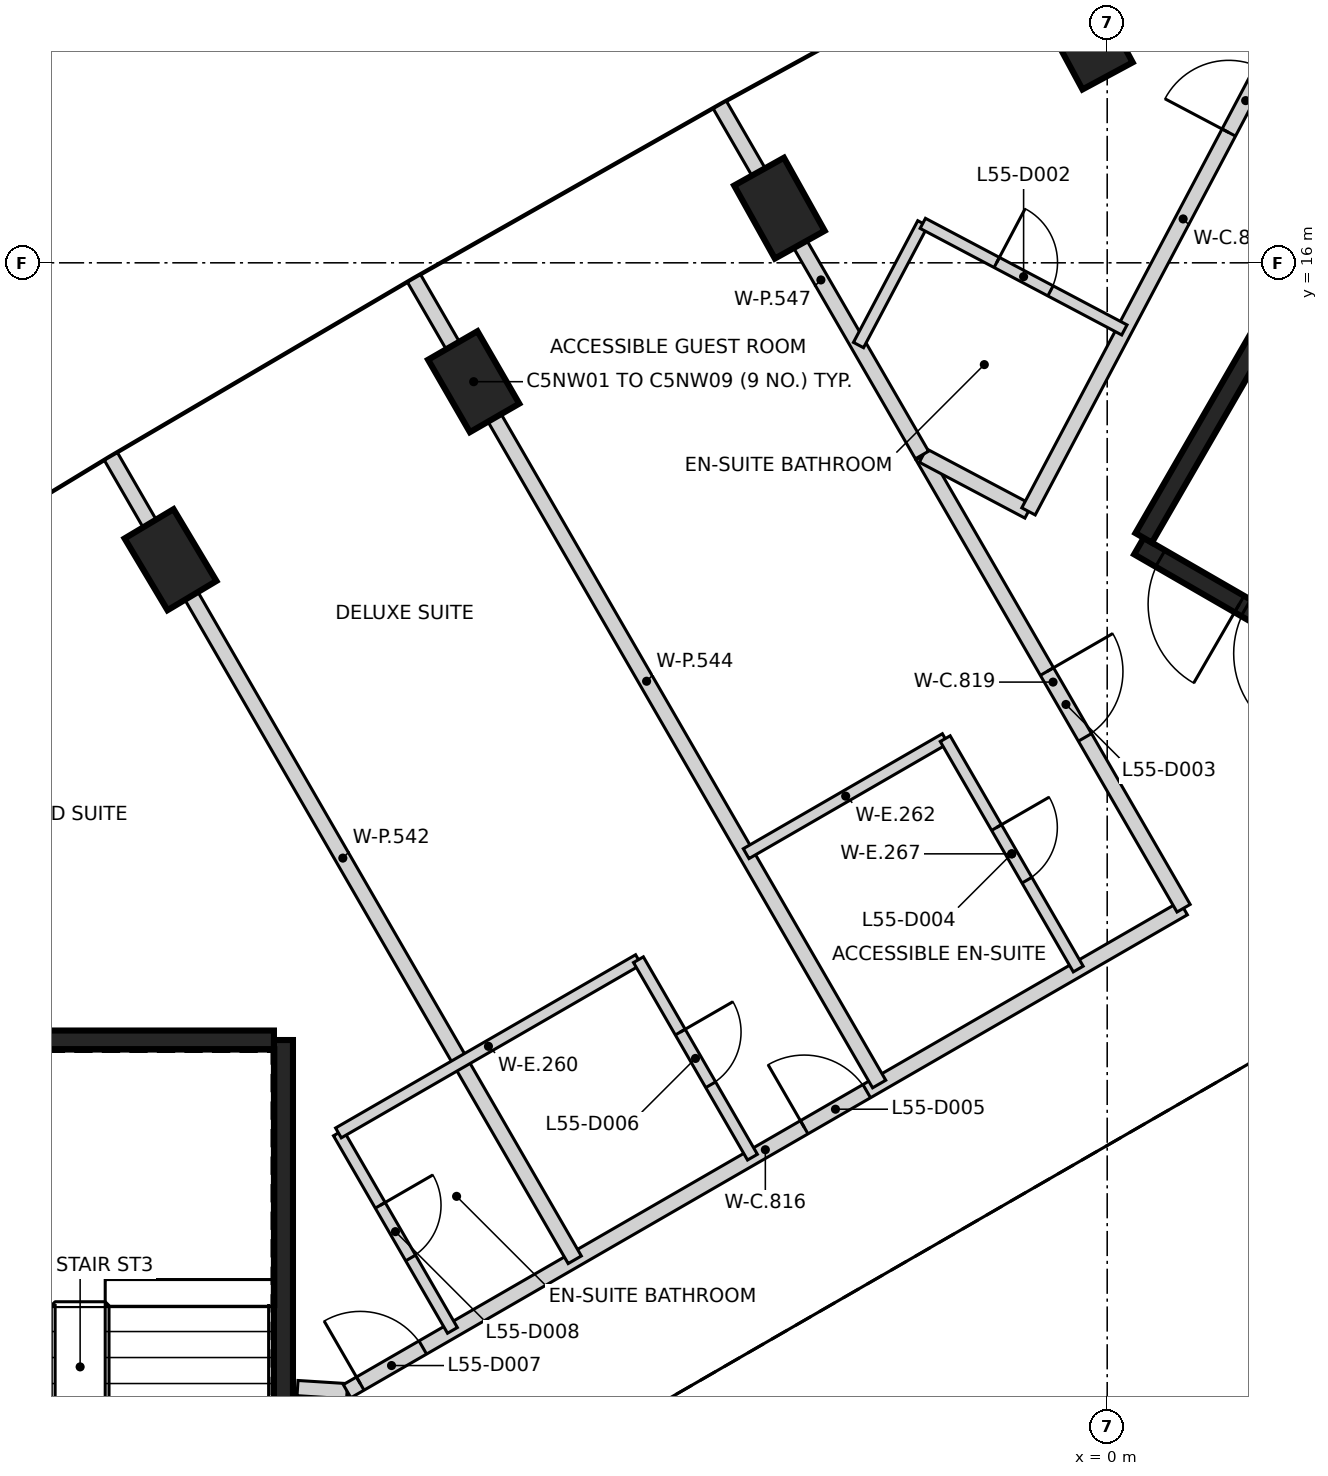
"""IFC4 building model, lengths in metres.
Left out: names, types, materials, properties, quantities, classifications, styles, units other than length and angle.
Written with IfcOpenShell. Run it as: python <this file> out.ifc"""

import sys

from ifc_helpers import new_model, si_unit, direction, frame, frame_2d, origin, origin_2d, place, context, subcontext, project, spatial, rectangle, extrude, element, fill, save


model = new_model("IFC4")
c1 = context("Model", 3, precision=1e-05, world=origin(), true_north=direction((0.0, 1.0)))
c2 = subcontext(c1, "Body", "Model", "MODEL_VIEW")
j1 = project(units=[si_unit("LENGTHUNIT", "METRE"), si_unit("PLANEANGLEUNIT", "RADIAN")], contexts=[c1])
p1 = place(None, origin())
s1 = spatial("IfcSite", under=j1, at=p1, CompositionType="ELEMENT")
p2 = place(p1, origin())
s2 = spatial("IfcBuilding", under=s1, at=p2, CompositionType="ELEMENT")
p3 = place(p2, frame((0.0, 0.0, 221.4)))
s3 = spatial("IfcBuildingStorey", under=s2, at=p3, CompositionType="ELEMENT", Elevation=221.4)
for number, where, z_axis, x_axis in (
    (1, (-0.256, 18.943, -0.35), (0.0, 0.0, 1.0), (-0.475, 0.88, 0.0)),
    (2, (-4.312, 16.719, -0.35), (0.0, 0.0, 1.0), (-0.487, 0.873, 0.0)),
    (3, (-8.335, 14.436, -0.35), (0.0, 0.0, 1.0), (-0.5, 0.866, 0.0)),
    (4, (-12.323, 12.094, -0.35), (0.0, 0.0, 1.0), (-0.513, 0.858, 0.0)),
):
    element("IfcColumn", number, at=place(p3, frame(where, z_axis=z_axis, x_axis=x_axis)), inside=s3, PredefinedType="COLUMN", context=c2, shape_type="SweptSolid", body=[
        extrude(rectangle(XDim=1.1, YDim=0.75, at=origin_2d()), origin(), (0.0, 0.0, 1.0), 3.6),
    ])
p4 = place(p3, frame((-10.837, 5.775, 0.0), z_axis=(0.0, 0.0, 1.0), x_axis=(0.0, -1.0, 0.0)))
e5 = element("IfcWall", 5, at=p4, inside=s3, PredefinedType="SHEAR", context=c2, shape_type="SweptSolid", body=[
    extrude(rectangle(XDim=11.55, YDim=0.25, at=frame_2d((5.775, 0.0))), origin(), (0.0, 0.0, 1.0), 3.25),
])
p5 = place(p4, frame((10.025, 0.0, 0.0)))
e6 = element("IfcOpeningElement", 6, at=p5, cuts=e5, PredefinedType="OPENING", context=c2, shape_type="SweptSolid", body=[
    extrude(rectangle(XDim=1.2, YDim=2.1, at=frame_2d((0.6, 1.05))), frame((0.0, 0.135, 0.0), z_axis=(0.0, -1.0, 0.0), x_axis=(1.0, 0.0, 0.0)), (0.0, 0.0, 1.0), 0.27),
])
p6 = place(p4, frame((8.725, 0.0, 0.0)))
e7 = element("IfcOpeningElement", 7, at=p6, cuts=e5, PredefinedType="OPENING", context=c2, shape_type="SweptSolid", body=[
    extrude(rectangle(XDim=1.2, YDim=2.1, at=frame_2d((0.6, 1.05))), frame((0.0, 0.135, 0.0), z_axis=(0.0, -1.0, 0.0), x_axis=(1.0, 0.0, 0.0)), (0.0, 0.0, 1.0), 0.27),
])
p7 = place(p3, frame((-16.472, 5.775, 0.0), z_axis=(0.0, 0.0, 1.0), x_axis=(1.0, 0.0, 0.0)))
e8 = element("IfcWall", 8, at=p7, inside=s3, PredefinedType="SHEAR", context=c2, shape_type="SweptSolid", body=[
    extrude(rectangle(XDim=5.51, YDim=0.25, at=frame_2d((2.755, 0.0))), origin(), (0.0, 0.0, 1.0), 3.25),
])
p8 = place(p3, frame((10.42, 6.498, 0.0), z_axis=(0.0, 0.0, 1.0), x_axis=(-0.866021906294, 0.500006057782, 0.0)))
e9 = element("IfcWall", 9, at=p8, inside=s3, PredefinedType="SHEAR", context=c2, shape_type="SweptSolid", body=[
    extrude(rectangle(XDim=11.55, YDim=0.25, at=frame_2d((5.775, 0.0))), origin(), (0.0, 0.0, 1.0), 3.25),
])
p9 = place(p8, frame((10.025, 0.0, 0.0)))
e10 = element("IfcOpeningElement", 10, at=p9, cuts=e9, PredefinedType="OPENING", context=c2, shape_type="SweptSolid", body=[
    extrude(rectangle(XDim=1.2, YDim=2.1, at=frame_2d((0.6, 1.05))), frame((0.0, 0.135, 0.0), z_axis=(0.0, -1.0, 0.0), x_axis=(1.0, 0.0, 0.0)), (0.0, 0.0, 1.0), 0.27),
])
p10 = place(p8, frame((8.725, 0.0, 0.0)))
e11 = element("IfcOpeningElement", 11, at=p10, cuts=e9, PredefinedType="OPENING", context=c2, shape_type="SweptSolid", body=[
    extrude(rectangle(XDim=1.2, YDim=2.1, at=frame_2d((0.6, 1.05))), frame((0.0, 0.135, 0.0), z_axis=(0.0, -1.0, 0.0), x_axis=(1.0, 0.0, 0.0)), (0.0, 0.0, 1.0), 0.27),
])
p11 = place(p3, frame((0.48, 12.381, 0.0), z_axis=(0.0, 0.0, 1.0), x_axis=(0.49999885962, 0.866026062182, 0.0)))
e12 = element("IfcWall", 12, at=p11, inside=s3, PredefinedType="SHEAR", context=c2, shape_type="SweptSolid", body=[
    extrude(rectangle(XDim=5.225, YDim=0.25, at=frame_2d((2.612, 0.0))), origin(), (0.0, 0.0, 1.0), 3.25),
])
p12 = place(p3, frame((-10.652, 1.196, 0.0), z_axis=(0.0, 0.0, 1.0), x_axis=(0.998005794618, -0.063122372489, 0.0)))
e13 = element("IfcWall", 13, at=p12, inside=s3, PredefinedType="PARTITIONING", context=c2, shape_type="SweptSolid", body=[
    extrude(rectangle(XDim=0.654, YDim=0.2, at=frame_2d((0.327, 0.0))), origin(), (0.0, 0.0, 1.0), 3.25),
])
p13 = place(p3, frame((-10.0, 1.155, 0.0), z_axis=(0.0, 0.0, 1.0), x_axis=(0.866014095592, 0.500019585852, 0.0)))
e14 = element("IfcWall", 14, at=p13, inside=s3, PredefinedType="PARTITIONING", context=c2, shape_type="SweptSolid", body=[
    extrude(rectangle(XDim=12.708, YDim=0.2, at=frame_2d((6.354, 0.0))), origin(), (0.0, 0.0, 1.0), 3.25),
])
p14 = place(p13, frame((6.944, 0.0, 0.0)))
e15 = element("IfcOpeningElement", 15, at=p14, cuts=e14, PredefinedType="OPENING", context=c2, shape_type="SweptSolid", body=[
    extrude(rectangle(XDim=0.95, YDim=2.1, at=frame_2d((0.475, 1.05))), frame((0.0, 0.11, 0.0), z_axis=(0.0, -1.0, 0.0), x_axis=(1.0, 0.0, 0.0)), (0.0, 0.0, 1.0), 0.22),
])
p15 = place(p13, frame((0.2, 0.0, 0.0)))
e16 = element("IfcOpeningElement", 16, at=p15, cuts=e14, PredefinedType="OPENING", context=c2, shape_type="SweptSolid", body=[
    extrude(rectangle(XDim=0.95, YDim=2.1, at=frame_2d((0.475, 1.05))), frame((0.0, 0.11, 0.0), z_axis=(0.0, -1.0, 0.0), x_axis=(1.0, 0.0, 0.0)), (0.0, 0.0, 1.0), 0.22),
])
p16 = place(p3, frame((-2.43, 13.459, 0.0), z_axis=(0.0, 0.0, 1.0), x_axis=(0.499957265187, -0.866050075334, 0.0)))
e17 = element("IfcWall", 17, at=p16, inside=s3, PredefinedType="PARTITIONING", context=c2, shape_type="SweptSolid", body=[
    extrude(rectangle(XDim=6.87, YDim=0.2, at=frame_2d((3.435, 0.0))), origin(), (0.0, 0.0, 1.0), 3.25),
])
p17 = place(p16, frame((3.275, 0.0, 0.0)))
e18 = element("IfcOpeningElement", 18, at=p17, cuts=e17, PredefinedType="OPENING", context=c2, shape_type="SweptSolid", body=[
    extrude(rectangle(XDim=1.0, YDim=2.1, at=frame_2d((0.5, 1.05))), frame((0.0, 0.11, 0.0), z_axis=(0.0, -1.0, 0.0), x_axis=(1.0, 0.0, 0.0)), (0.0, 0.0, 1.0), 0.22),
])
p18 = place(p3, frame((-2.425, 13.465, 0.0), z_axis=(0.0, 0.0, 1.0), x_axis=(0.883874806572, -0.467723557572, 0.0)))
e19 = element("IfcWall", 19, at=p18, inside=s3, PredefinedType="PARTITIONING", context=c2, shape_type="SweptSolid", body=[
    extrude(rectangle(XDim=1.572, YDim=0.2, at=frame_2d((0.786, 0.0))), origin(), (0.0, 0.0, 1.0), 3.25),
])
p19 = place(p3, frame((-1.035, 12.73, 0.0), z_axis=(0.0, 0.0, 1.0), x_axis=(0.46738248691, 0.884055208078, 0.0)))
e20 = element("IfcWall", 20, at=p19, inside=s3, PredefinedType="PARTITIONING", context=c2, shape_type="SweptSolid", body=[
    extrude(rectangle(XDim=8.705, YDim=0.2, at=frame_2d((4.352, 0.0))), origin(), (0.0, 0.0, 1.0), 3.25),
])
p20 = place(p19, frame((5.638, 0.0, 0.0)))
e21 = element("IfcOpeningElement", 21, at=p20, cuts=e20, PredefinedType="OPENING", context=c2, shape_type="SweptSolid", body=[
    extrude(rectangle(XDim=0.95, YDim=2.1, at=frame_2d((0.475, 1.05))), frame((0.0, 0.11, 0.0), z_axis=(0.0, -1.0, 0.0), x_axis=(1.0, 0.0, 0.0)), (0.0, 0.0, 1.0), 0.22),
])
p21 = place(p3, frame((-13.107, 13.453, 0.0), z_axis=(0.0, 0.0, 1.0), x_axis=(0.500037611077, -0.86600368793, 0.0)))
e22 = element("IfcWall", 22, at=p21, inside=s3, PredefinedType="PARTITIONING", context=c2, shape_type="SweptSolid", body=[
    extrude(rectangle(XDim=12.204, YDim=0.2, at=frame_2d((6.102, 0.0))), origin(), (0.0, 0.0, 1.0), 3.25),
])
p22 = place(p3, frame((-9.119, 15.795, 0.0), z_axis=(0.0, 0.0, 1.0), x_axis=(0.50001601051, -0.866016159915, 0.0)))
e23 = element("IfcWall", 23, at=p22, inside=s3, PredefinedType="PARTITIONING", context=c2, shape_type="SweptSolid", body=[
    extrude(rectangle(XDim=12.238, YDim=0.2, at=frame_2d((6.119, 0.0))), origin(), (0.0, 0.0, 1.0), 3.25),
])
p23 = place(p3, frame((-5.097, 18.078, 0.0), z_axis=(0.0, 0.0, 1.0), x_axis=(0.50004820116, -0.865997573043, 0.0)))
e24 = element("IfcWall", 24, at=p23, inside=s3, PredefinedType="PARTITIONING", context=c2, shape_type="SweptSolid", body=[
    extrude(rectangle(XDim=5.32, YDim=0.2, at=frame_2d((2.66, 0.0))), origin(), (0.0, 0.0, 1.0), 3.25),
])
p24 = place(p3, frame((-10.114, 4.553, 0.0), z_axis=(0.0, 0.0, 1.0), x_axis=(0.50002537861, -0.866010750942, 0.0)))
e25 = element("IfcWall", 25, at=p24, inside=s3, PredefinedType="PARTITIONING", context=c2, shape_type="SweptSolid", body=[
    extrude(rectangle(XDim=3.0, YDim=0.15, at=frame_2d((1.5, 0.0))), origin(), (0.0, 0.0, 1.0), 3.25),
])
p25 = place(p24, frame((1.1, 0.0, 0.0)))
e26 = element("IfcOpeningElement", 26, at=p25, cuts=e25, PredefinedType="OPENING", context=c2, shape_type="SweptSolid", body=[
    extrude(rectangle(XDim=0.8, YDim=2.1, at=frame_2d((0.4, 1.05))), frame((0.0, 0.085, 0.0), z_axis=(0.0, -1.0, 0.0), x_axis=(1.0, 0.0, 0.0)), (0.0, 0.0, 1.0), 0.17),
])
p26 = place(p3, frame((-10.114, 4.553, 0.0), z_axis=(0.0, 0.0, 1.0), x_axis=(0.866002713795, 0.500039298155, 0.0)))
e27 = element("IfcWall", 27, at=p26, inside=s3, PredefinedType="PARTITIONING", context=c2, shape_type="SweptSolid", body=[
    extrude(rectangle(XDim=4.558, YDim=0.15, at=frame_2d((2.279, 0.0))), origin(), (0.0, 0.0, 1.0), 3.25),
])
p27 = place(p3, frame((-6.167, 6.832, 0.0), z_axis=(0.0, 0.0, 1.0), x_axis=(0.499990139034, -0.866031096941, 0.0)))
e28 = element("IfcWall", 28, at=p27, inside=s3, PredefinedType="PARTITIONING", context=c2, shape_type="SweptSolid", body=[
    extrude(rectangle(XDim=3.0, YDim=0.15, at=frame_2d((1.5, 0.0))), origin(), (0.0, 0.0, 1.0), 3.25),
])
p28 = place(p27, frame((1.1, 0.0, 0.0)))
e29 = element("IfcOpeningElement", 29, at=p28, cuts=e28, PredefinedType="OPENING", context=c2, shape_type="SweptSolid", body=[
    extrude(rectangle(XDim=0.8, YDim=2.1, at=frame_2d((0.4, 1.05))), frame((0.0, 0.085, 0.0), z_axis=(0.0, -1.0, 0.0), x_axis=(1.0, 0.0, 0.0)), (0.0, 0.0, 1.0), 0.17),
])
p29 = place(p3, frame((-4.75, 8.227, 0.0), z_axis=(0.0, 0.0, 1.0), x_axis=(0.865893821749, 0.500227837548, 0.0)))
e30 = element("IfcWall", 30, at=p29, inside=s3, PredefinedType="PARTITIONING", context=c2, shape_type="SweptSolid", body=[
    extrude(rectangle(XDim=3.024, YDim=0.15, at=frame_2d((1.512, 0.0))), origin(), (0.0, 0.0, 1.0), 3.25),
])
p30 = place(p3, frame((-3.272, 14.918, 0.0), z_axis=(0.0, 0.0, 1.0), x_axis=(0.467162796658, 0.884171319043, 0.0)))
e31 = element("IfcWall", 31, at=p30, inside=s3, PredefinedType="PARTITIONING", context=c2, shape_type="SweptSolid", body=[
    extrude(rectangle(XDim=1.811, YDim=0.15, at=frame_2d((0.905, 0.0))), origin(), (0.0, 0.0, 1.0), 3.25),
])
p31 = place(p3, frame((-2.426, 16.519, 0.0), z_axis=(0.0, 0.0, 1.0), x_axis=(0.884056991815, -0.467379112952, 0.0)))
e32 = element("IfcWall", 32, at=p31, inside=s3, PredefinedType="PARTITIONING", context=c2, shape_type="SweptSolid", body=[
    extrude(rectangle(XDim=3.0, YDim=0.15, at=frame_2d((1.5, 0.0))), origin(), (0.0, 0.0, 1.0), 3.25),
])
p32 = place(p31, frame((1.1, 0.0, 0.0)))
e33 = element("IfcOpeningElement", 33, at=p32, cuts=e32, PredefinedType="OPENING", context=c2, shape_type="SweptSolid", body=[
    extrude(rectangle(XDim=0.8, YDim=2.1, at=frame_2d((0.4, 1.05))), frame((0.0, 0.085, 0.0), z_axis=(0.0, -1.0, 0.0), x_axis=(1.0, 0.0, 0.0)), (0.0, 0.0, 1.0), 0.17),
])
p33 = place(p3, frame((-2.131, 9.74, 0.0), z_axis=(0.0, 0.0, 1.0), x_axis=(0.500010275428, -0.866019471182, 0.0)))
e34 = element("IfcWall", 34, at=p33, inside=s3, PredefinedType="PARTITIONING", context=c2, shape_type="SweptSolid", body=[
    extrude(rectangle(XDim=3.5, YDim=0.15, at=frame_2d((1.75, 0.0))), origin(), (0.0, 0.0, 1.0), 3.25),
])
p34 = place(p33, frame((1.35, 0.0, 0.0)))
e35 = element("IfcOpeningElement", 35, at=p34, cuts=e34, PredefinedType="OPENING", context=c2, shape_type="SweptSolid", body=[
    extrude(rectangle(XDim=0.8, YDim=2.1, at=frame_2d((0.4, 1.05))), frame((0.0, 0.085, 0.0), z_axis=(0.0, -1.0, 0.0), x_axis=(1.0, 0.0, 0.0)), (0.0, 0.0, 1.0), 0.17),
])
p35 = place(p9, origin())
e36 = element("IfcDoor", 36, at=p35, inside=s3, OperationType="SINGLE_SWING_LEFT", PredefinedType="DOOR", context=c2, shape_type="SweptSolid", body=[
    extrude(rectangle(XDim=1.2, YDim=2.1, at=frame_2d((0.6, 1.05))), frame((0.0, 0.025, 0.0), z_axis=(0.0, -1.0, 0.0), x_axis=(1.0, 0.0, 0.0)), (0.0, 0.0, 1.0), 0.05),
])
fill(e10, e36)
p36 = place(p10, origin())
e37 = element("IfcDoor", 37, at=p36, inside=s3, OperationType="SINGLE_SWING_RIGHT", PredefinedType="DOOR", context=c2, shape_type="SweptSolid", body=[
    extrude(rectangle(XDim=1.2, YDim=2.1, at=frame_2d((0.6, 1.05))), frame((0.0, 0.025, 0.0), z_axis=(0.0, -1.0, 0.0), x_axis=(1.0, 0.0, 0.0)), (0.0, 0.0, 1.0), 0.05),
])
fill(e11, e37)
p37 = place(p20, frame((0.95, 0.0, 0.0), z_axis=(0.0, 0.0, 1.0), x_axis=(-1.0, 0.0, 0.0)))
e38 = element("IfcDoor", 38, at=p37, inside=s3, OperationType="SINGLE_SWING_LEFT", PredefinedType="DOOR", context=c2, shape_type="SweptSolid", body=[
    extrude(rectangle(XDim=0.95, YDim=2.1, at=frame_2d((0.475, 1.05))), frame((0.0, 0.025, 0.0), z_axis=(0.0, -1.0, 0.0), x_axis=(1.0, 0.0, 0.0)), (0.0, 0.0, 1.0), 0.05),
])
fill(e21, e38)
p38 = place(p32, origin())
e39 = element("IfcDoor", 39, at=p38, inside=s3, OperationType="SINGLE_SWING_LEFT", PredefinedType="DOOR", context=c2, shape_type="SweptSolid", body=[
    extrude(rectangle(XDim=0.8, YDim=2.1, at=frame_2d((0.4, 1.05))), frame((0.0, 0.025, 0.0), z_axis=(0.0, -1.0, 0.0), x_axis=(1.0, 0.0, 0.0)), (0.0, 0.0, 1.0), 0.05),
])
fill(e33, e39)
p39 = place(p17, frame((1.0, 0.0, 0.0), z_axis=(0.0, 0.0, 1.0), x_axis=(-1.0, 0.0, 0.0)))
e40 = element("IfcDoor", 40, at=p39, inside=s3, OperationType="SINGLE_SWING_LEFT", PredefinedType="DOOR", context=c2, shape_type="SweptSolid", body=[
    extrude(rectangle(XDim=1.0, YDim=2.1, at=frame_2d((0.5, 1.05))), frame((0.0, 0.025, 0.0), z_axis=(0.0, -1.0, 0.0), x_axis=(1.0, 0.0, 0.0)), (0.0, 0.0, 1.0), 0.05),
])
fill(e18, e40)
p40 = place(p34, frame((0.8, 0.0, 0.0), z_axis=(0.0, 0.0, 1.0), x_axis=(-1.0, 0.0, 0.0)))
e41 = element("IfcDoor", 41, at=p40, inside=s3, OperationType="SINGLE_SWING_LEFT", PredefinedType="DOOR", context=c2, shape_type="SweptSolid", body=[
    extrude(rectangle(XDim=0.8, YDim=2.1, at=frame_2d((0.4, 1.05))), frame((0.0, 0.025, 0.0), z_axis=(0.0, -1.0, 0.0), x_axis=(1.0, 0.0, 0.0)), (0.0, 0.0, 1.0), 0.05),
])
fill(e35, e41)
p41 = place(p14, origin())
e42 = element("IfcDoor", 42, at=p41, inside=s3, OperationType="SINGLE_SWING_LEFT", PredefinedType="DOOR", context=c2, shape_type="SweptSolid", body=[
    extrude(rectangle(XDim=0.95, YDim=2.1, at=frame_2d((0.475, 1.05))), frame((0.0, 0.025, 0.0), z_axis=(0.0, -1.0, 0.0), x_axis=(1.0, 0.0, 0.0)), (0.0, 0.0, 1.0), 0.05),
])
fill(e15, e42)
p42 = place(p28, frame((0.8, 0.0, 0.0), z_axis=(0.0, 0.0, 1.0), x_axis=(-1.0, 0.0, 0.0)))
e43 = element("IfcDoor", 43, at=p42, inside=s3, OperationType="SINGLE_SWING_LEFT", PredefinedType="DOOR", context=c2, shape_type="SweptSolid", body=[
    extrude(rectangle(XDim=0.8, YDim=2.1, at=frame_2d((0.4, 1.05))), frame((0.0, 0.025, 0.0), z_axis=(0.0, -1.0, 0.0), x_axis=(1.0, 0.0, 0.0)), (0.0, 0.0, 1.0), 0.05),
])
fill(e29, e43)
p43 = place(p15, origin())
e44 = element("IfcDoor", 44, at=p43, inside=s3, OperationType="SINGLE_SWING_LEFT", PredefinedType="DOOR", context=c2, shape_type="SweptSolid", body=[
    extrude(rectangle(XDim=0.95, YDim=2.1, at=frame_2d((0.475, 1.05))), frame((0.0, 0.025, 0.0), z_axis=(0.0, -1.0, 0.0), x_axis=(1.0, 0.0, 0.0)), (0.0, 0.0, 1.0), 0.05),
])
fill(e16, e44)
p44 = place(p25, frame((0.8, 0.0, 0.0), z_axis=(0.0, 0.0, 1.0), x_axis=(-1.0, 0.0, 0.0)))
e45 = element("IfcDoor", 45, at=p44, inside=s3, OperationType="SINGLE_SWING_LEFT", PredefinedType="DOOR", context=c2, shape_type="SweptSolid", body=[
    extrude(rectangle(XDim=0.8, YDim=2.1, at=frame_2d((0.4, 1.05))), frame((0.0, 0.025, 0.0), z_axis=(0.0, -1.0, 0.0), x_axis=(1.0, 0.0, 0.0)), (0.0, 0.0, 1.0), 0.05),
])
fill(e26, e45)
save(model, sys.argv[1])
